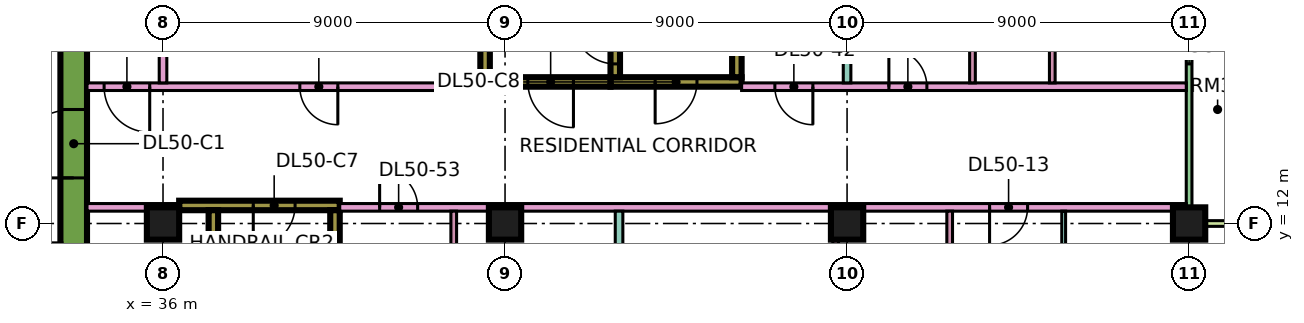
"""IFC4 building model, lengths in metres.
Left out: names, types, materials, properties, quantities, classifications, styles, units other than length and angle.
Written with IfcOpenShell. Run it as: python <this file> out.ifc"""

import sys

from ifc_helpers import new_model, si_unit, direction, frame, frame_2d, origin, origin_2d, place, context, subcontext, project, spatial, rectangle, extrude, element, fill, save


model = new_model("IFC4")
c1 = context("Model", 3, precision=1e-05, world=origin(), true_north=direction((0.0, 1.0)))
c2 = subcontext(c1, "Body", "Model", "MODEL_VIEW")
j1 = project(units=[si_unit("LENGTHUNIT", "METRE"), si_unit("PLANEANGLEUNIT", "RADIAN")], contexts=[c1])
p1 = place(None, origin())
s1 = spatial("IfcSite", under=j1, at=p1, CompositionType="ELEMENT")
p2 = place(p1, origin())
s2 = spatial("IfcBuilding", under=s1, at=p2, CompositionType="ELEMENT")
p3 = place(p2, frame((0.0, 0.0, 215.4)))
s3 = spatial("IfcBuildingStorey", under=s2, at=p3, CompositionType="ELEMENT", Elevation=215.4)
for number, where, z_axis, x_axis in (
    (1, (36.0, 12.0, 0.0), (0.0, 0.0, 1.0), (1.0, 0.0, 0.0)),
    (2, (45.0, 12.0, 0.0), (0.0, 0.0, 1.0), (1.0, 0.0, 0.0)),
    (3, (54.0, 12.0, 0.0), (0.0, 0.0, 1.0), (1.0, 0.0, 0.0)),
    (4, (63.0, 12.0, 0.0), (0.0, 0.0, 1.0), (1.0, 0.0, 0.0)),
):
    element("IfcColumn", number, at=place(p3, frame(where, z_axis=z_axis, x_axis=x_axis)), inside=s3, PredefinedType="COLUMN", context=c2, shape_type="SweptSolid", body=[
        extrude(rectangle(XDim=0.85, YDim=0.85, at=origin_2d()), origin(), (0.0, 0.0, 1.0), 3.75),
    ])
p4 = place(p3, frame((33.65, 7.7, 0.0), z_axis=(0.0, 0.0, 1.0), x_axis=(0.0, 1.0, 0.0)))
e5 = element("IfcWall", 5, at=p4, inside=s3, PredefinedType="SHEAR", context=c2, shape_type="SweptSolid", body=[
    extrude(rectangle(XDim=11.6, YDim=0.7, at=frame_2d((5.8, 0.0))), origin(), (0.0, 0.0, 1.0), 3.75),
])
p5 = place(p4, frame((5.5, 0.0, 0.0)))
e6 = element("IfcOpeningElement", 6, at=p5, cuts=e5, PredefinedType="OPENING", context=c2, shape_type="SweptSolid", body=[
    extrude(rectangle(XDim=1.8, YDim=2.4, at=frame_2d((0.9, 1.2))), frame((0.0, 0.36, 0.0), z_axis=(0.0, -1.0, 0.0), x_axis=(1.0, 0.0, 0.0)), (0.0, 0.0, 1.0), 0.72),
])
p6 = place(p3, frame((36.425, 12.475, 0.0), z_axis=(0.0, 0.0, 1.0), x_axis=(1.0, 0.0, 0.0)))
e7 = element("IfcWall", 7, at=p6, inside=s3, PredefinedType="SHEAR", context=c2, shape_type="SweptSolid", body=[
    extrude(rectangle(XDim=4.225, YDim=0.25, at=frame_2d((2.112, 0.0))), origin(), (0.0, 0.0, 1.0), 3.75),
])
p7 = place(p6, frame((1.95, 0.0, 0.0)))
e8 = element("IfcOpeningElement", 8, at=p7, cuts=e7, PredefinedType="OPENING", context=c2, shape_type="SweptSolid", body=[
    extrude(rectangle(XDim=1.1, YDim=2.2, at=frame_2d((0.55, 1.1))), frame((0.0, 0.135, 0.0), z_axis=(0.0, -1.0, 0.0), x_axis=(1.0, 0.0, 0.0)), (0.0, 0.0, 1.0), 0.27),
])
for number, where, z_axis, x_axis in (
    (9, (37.325, 5.85, 0.0), (0.0, 0.0, 1.0), (0.0, 1.0, 0.0)),
    (10, (40.525, 5.85, 0.0), (0.0, 0.0, 1.0), (0.0, 1.0, 0.0)),
):
    element("IfcWall", number, at=place(p3, frame(where, z_axis=z_axis, x_axis=x_axis)), inside=s3, PredefinedType="SHEAR", context=c2, shape_type="SweptSolid", body=[
        extrude(rectangle(XDim=6.5, YDim=0.25, at=frame_2d((3.25, 0.0))), origin(), (0.0, 0.0, 1.0), 3.75),
    ])
p8 = place(p3, frame((47.775, 15.725, 0.0), z_axis=(0.0, 0.0, 1.0), x_axis=(1.0, 0.0, 0.0)))
e11 = element("IfcWall", 11, at=p8, inside=s3, PredefinedType="SHEAR", context=c2, shape_type="SweptSolid", body=[
    extrude(rectangle(XDim=3.45, YDim=0.25, at=frame_2d((1.725, 0.0))), origin(), (0.0, 0.0, 1.0), 3.75),
])
p9 = place(p8, frame((1.175, 0.0, 0.0)))
e12 = element("IfcOpeningElement", 12, at=p9, cuts=e11, PredefinedType="OPENING", context=c2, shape_type="SweptSolid", body=[
    extrude(rectangle(XDim=1.1, YDim=2.2, at=frame_2d((0.55, 1.1))), frame((0.0, 0.135, 0.0), z_axis=(0.0, -1.0, 0.0), x_axis=(1.0, 0.0, 0.0)), (0.0, 0.0, 1.0), 0.27),
])
p10 = place(p3, frame((47.9, 15.85, 0.0), z_axis=(0.0, 0.0, 1.0), x_axis=(0.0, 1.0, 0.0)))
e13 = element("IfcWall", 13, at=p10, inside=s3, PredefinedType="SHEAR", context=c2, shape_type="SweptSolid", body=[
    extrude(rectangle(XDim=6.5, YDim=0.25, at=frame_2d((3.25, 0.0))), origin(), (0.0, 0.0, 1.0), 3.75),
])
p11 = place(p10, frame((0.35, 0.0, 0.0)))
e14 = element("IfcOpeningElement", 14, at=p11, cuts=e13, PredefinedType="OPENING", context=c2, shape_type="SweptSolid", body=[
    extrude(rectangle(XDim=1.1, YDim=2.2, at=frame_2d((0.55, 1.1))), frame((0.0, 0.135, 0.0), z_axis=(0.0, -1.0, 0.0), x_axis=(1.0, 0.0, 0.0)), (0.0, 0.0, 1.0), 0.27),
])
p12 = place(p3, frame((51.1, 15.85, 0.0), z_axis=(0.0, 0.0, 1.0), x_axis=(0.0, 1.0, 0.0)))
e15 = element("IfcWall", 15, at=p12, inside=s3, PredefinedType="SHEAR", context=c2, shape_type="SweptSolid", body=[
    extrude(rectangle(XDim=6.5, YDim=0.25, at=frame_2d((3.25, 0.0))), origin(), (0.0, 0.0, 1.0), 3.75),
])
p13 = place(p3, frame((44.35, 15.725, 0.0), z_axis=(0.0, 0.0, 1.0), x_axis=(1.0, 0.0, 0.0)))
e16 = element("IfcWall", 16, at=p13, inside=s3, PredefinedType="SHEAR", context=c2, shape_type="SweptSolid", body=[
    extrude(rectangle(XDim=3.425, YDim=0.25, at=frame_2d((1.712, 0.0))), origin(), (0.0, 0.0, 1.0), 3.75),
])
p14 = place(p13, frame((1.25, 0.0, 0.0)))
e17 = element("IfcOpeningElement", 17, at=p14, cuts=e16, PredefinedType="OPENING", context=c2, shape_type="SweptSolid", body=[
    extrude(rectangle(XDim=1.2, YDim=2.2, at=frame_2d((0.6, 1.1))), frame((0.0, 0.135, 0.0), z_axis=(0.0, -1.0, 0.0), x_axis=(1.0, 0.0, 0.0)), (0.0, 0.0, 1.0), 0.27),
])
p15 = place(p3, frame((44.475, 15.85, 0.0), z_axis=(0.0, 0.0, 1.0), x_axis=(0.0, 1.0, 0.0)))
e18 = element("IfcWall", 18, at=p15, inside=s3, PredefinedType="SHEAR", context=c2, shape_type="SweptSolid", body=[
    extrude(rectangle(XDim=6.5, YDim=0.25, at=frame_2d((3.25, 0.0))), origin(), (0.0, 0.0, 1.0), 3.75),
])
p16 = place(p15, frame((1.75, 0.0, 0.0)))
e19 = element("IfcOpeningElement", 19, at=p16, cuts=e18, PredefinedType="OPENING", context=c2, shape_type="SweptSolid", body=[
    extrude(rectangle(XDim=1.1, YDim=2.2, at=frame_2d((0.55, 1.1))), frame((0.0, 0.135, 0.0), z_axis=(0.0, -1.0, 0.0), x_axis=(1.0, 0.0, 0.0)), (0.0, 0.0, 1.0), 0.27),
])
p17 = place(p15, frame((4.3, 0.0, 0.0)))
e20 = element("IfcOpeningElement", 20, at=p17, cuts=e18, PredefinedType="OPENING", context=c2, shape_type="SweptSolid", body=[
    extrude(rectangle(XDim=1.1, YDim=2.2, at=frame_2d((0.55, 1.1))), frame((0.0, 0.135, 0.0), z_axis=(0.0, -1.0, 0.0), x_axis=(1.0, 0.0, 0.0)), (0.0, 0.0, 1.0), 0.27),
])
p18 = place(p3, frame((63.0, 12.075, 0.0), z_axis=(0.0, 0.0, 1.0), x_axis=(0.0, 1.0, 0.0)))
e21 = element("IfcWall", 21, at=p18, inside=s3, PredefinedType="SOLIDWALL", context=c2, shape_type="SweptSolid", body=[
    extrude(rectangle(XDim=10.35, YDim=0.15, at=frame_2d((5.175, 0.0))), origin(), (0.0, 0.0, 1.0), 3.35),
])
p19 = place(p18, frame((4.125, 0.0, 0.45)))
e22 = element("IfcOpeningElement", 22, at=p19, cuts=e21, PredefinedType="OPENING", context=c2, shape_type="SweptSolid", body=[
    extrude(rectangle(XDim=1.8, YDim=2.4, at=frame_2d((0.9, 1.2))), frame((0.0, 0.085, 0.0), z_axis=(0.0, -1.0, 0.0), x_axis=(1.0, 0.0, 0.0)), (0.0, 0.0, 1.0), 0.17),
])
p20 = place(p18, frame((7.538, 0.0, 0.0)))
e23 = element("IfcOpeningElement", 23, at=p20, cuts=e21, PredefinedType="OPENING", context=c2, shape_type="SweptSolid", body=[
    extrude(rectangle(XDim=1.8, YDim=2.4, at=frame_2d((0.9, 1.2))), frame((0.0, 0.085, 0.0), z_axis=(0.0, -1.0, 0.0), x_axis=(1.0, 0.0, 0.0)), (0.0, 0.0, 1.0), 0.17),
])
p21 = place(p3, frame((64.5, 12.0, 0.0), z_axis=(0.0, 0.0, 1.0), x_axis=(-1.0, 0.0, 0.0)))
e24 = element("IfcWall", 24, at=p21, inside=s3, PredefinedType="SOLIDWALL", context=c2, shape_type="SweptSolid", body=[
    extrude(rectangle(XDim=1.5, YDim=0.15, at=frame_2d((0.75, 0.0))), origin(), (0.0, 0.0, 1.0), 3.35),
])
p22 = place(p3, frame((34.0, 12.425, 0.0), z_axis=(0.0, 0.0, 1.0), x_axis=(1.0, 0.0, 0.0)))
e25 = element("IfcWall", 25, at=p22, inside=s3, PredefinedType="PARTITIONING", context=c2, shape_type="SweptSolid", body=[
    extrude(rectangle(XDim=2.426, YDim=0.2, at=frame_2d((1.213, 0.0))), origin(), (0.0, 0.0, 1.0), 3.35),
])
p23 = place(p3, frame((34.0, 15.6, 0.0), z_axis=(0.0, 0.0, 1.0), x_axis=(1.0, 0.0, 0.0)))
e26 = element("IfcWall", 26, at=p23, inside=s3, PredefinedType="PARTITIONING", context=c2, shape_type="SweptSolid", body=[
    extrude(rectangle(XDim=10.35, YDim=0.2, at=frame_2d((5.175, 0.0))), origin(), (0.0, 0.0, 1.0), 3.35),
])
p24 = place(p23, frame((5.6, 0.0, 0.0)))
e27 = element("IfcOpeningElement", 27, at=p24, cuts=e26, PredefinedType="OPENING", context=c2, shape_type="SweptSolid", body=[
    extrude(rectangle(XDim=1.0, YDim=2.1, at=frame_2d((0.5, 1.05))), frame((0.0, 0.11, 0.0), z_axis=(0.0, -1.0, 0.0), x_axis=(1.0, 0.0, 0.0)), (0.0, 0.0, 1.0), 0.22),
])
p25 = place(p23, frame((0.45, 0.0, 0.0)))
e28 = element("IfcOpeningElement", 28, at=p25, cuts=e26, PredefinedType="OPENING", context=c2, shape_type="SweptSolid", body=[
    extrude(rectangle(XDim=1.2, YDim=2.1, at=frame_2d((0.6, 1.05))), frame((0.0, 0.11, 0.0), z_axis=(0.0, -1.0, 0.0), x_axis=(1.0, 0.0, 0.0)), (0.0, 0.0, 1.0), 0.22),
])
p26 = place(p3, frame((36.0, 15.7, 0.0), z_axis=(0.0, 0.0, 1.0), x_axis=(0.0, 1.0, 0.0)))
e29 = element("IfcWall", 29, at=p26, inside=s3, PredefinedType="PARTITIONING", context=c2, shape_type="SweptSolid", body=[
    extrude(rectangle(XDim=8.3, YDim=0.2, at=frame_2d((4.15, 0.0))), origin(), (0.0, 0.0, 1.0), 3.35),
])
p27 = place(p3, frame((40.65, 12.425, 0.0), z_axis=(0.0, 0.0, 1.0), x_axis=(1.0, 0.0, 0.0)))
e30 = element("IfcWall", 30, at=p27, inside=s3, PredefinedType="PARTITIONING", context=c2, shape_type="SweptSolid", body=[
    extrude(rectangle(XDim=22.276, YDim=0.2, at=frame_2d((11.138, 0.0))), origin(), (0.0, 0.0, 1.0), 3.35),
])
p28 = place(p27, frame((17.1, 0.0, 0.0)))
e31 = element("IfcOpeningElement", 31, at=p28, cuts=e30, PredefinedType="OPENING", context=c2, shape_type="SweptSolid", body=[
    extrude(rectangle(XDim=1.0, YDim=2.1, at=frame_2d((0.5, 1.05))), frame((0.0, 0.11, 0.0), z_axis=(0.0, -1.0, 0.0), x_axis=(1.0, 0.0, 0.0)), (0.0, 0.0, 1.0), 0.22),
])
p29 = place(p27, frame((1.05, 0.0, 0.0)))
e32 = element("IfcOpeningElement", 32, at=p29, cuts=e30, PredefinedType="OPENING", context=c2, shape_type="SweptSolid", body=[
    extrude(rectangle(XDim=1.0, YDim=2.1, at=frame_2d((0.5, 1.05))), frame((0.0, 0.11, 0.0), z_axis=(0.0, -1.0, 0.0), x_axis=(1.0, 0.0, 0.0)), (0.0, 0.0, 1.0), 0.22),
])
p30 = place(p3, frame((43.65, 5.825, 0.0), z_axis=(0.0, 0.0, 1.0), x_axis=(0.0, 1.0, 0.0)))
e33 = element("IfcWall", 33, at=p30, inside=s3, PredefinedType="PARTITIONING", context=c2, shape_type="SweptSolid", body=[
    extrude(rectangle(XDim=6.5, YDim=0.15, at=frame_2d((3.25, 0.0))), origin(), (0.0, 0.0, 1.0), 3.35),
])
p31 = place(p30, frame((4.425, 0.0, 0.0)))
e34 = element("IfcOpeningElement", 34, at=p31, cuts=e33, PredefinedType="OPENING", context=c2, shape_type="SweptSolid", body=[
    extrude(rectangle(XDim=0.9, YDim=2.1, at=frame_2d((0.45, 1.05))), frame((0.0, 0.085, 0.0), z_axis=(0.0, -1.0, 0.0), x_axis=(1.0, 0.0, 0.0)), (0.0, 0.0, 1.0), 0.17),
])
p32 = place(p3, frame((48.0, 5.825, 0.0), z_axis=(0.0, 0.0, 1.0), x_axis=(0.0, 1.0, 0.0)))
e35 = element("IfcWall", 35, at=p32, inside=s3, PredefinedType="PARTITIONING", context=c2, shape_type="SweptSolid", body=[
    extrude(rectangle(XDim=6.5, YDim=0.2, at=frame_2d((3.25, 0.0))), origin(), (0.0, 0.0, 1.0), 3.35),
])
p33 = place(p3, frame((51.225, 15.6, 0.0), z_axis=(0.0, 0.0, 1.0), x_axis=(1.0, 0.0, 0.0)))
e36 = element("IfcWall", 36, at=p33, inside=s3, PredefinedType="PARTITIONING", context=c2, shape_type="SweptSolid", body=[
    extrude(rectangle(XDim=11.701, YDim=0.2, at=frame_2d((5.851, 0.0))), origin(), (0.0, 0.0, 1.0), 3.35),
])
p34 = place(p33, frame((3.875, 0.0, 0.0)))
e37 = element("IfcOpeningElement", 37, at=p34, cuts=e36, PredefinedType="OPENING", context=c2, shape_type="SweptSolid", body=[
    extrude(rectangle(XDim=1.0, YDim=2.1, at=frame_2d((0.5, 1.05))), frame((0.0, 0.11, 0.0), z_axis=(0.0, -1.0, 0.0), x_axis=(1.0, 0.0, 0.0)), (0.0, 0.0, 1.0), 0.22),
])
p35 = place(p33, frame((0.875, 0.0, 0.0)))
e38 = element("IfcOpeningElement", 38, at=p35, cuts=e36, PredefinedType="OPENING", context=c2, shape_type="SweptSolid", body=[
    extrude(rectangle(XDim=1.0, YDim=2.1, at=frame_2d((0.5, 1.05))), frame((0.0, 0.11, 0.0), z_axis=(0.0, -1.0, 0.0), x_axis=(1.0, 0.0, 0.0)), (0.0, 0.0, 1.0), 0.22),
])
p36 = place(p3, frame((53.7, 7.1, 0.0), z_axis=(0.0, 0.0, 1.0), x_axis=(0.0, 1.0, 0.0)))
e39 = element("IfcWall", 39, at=p36, inside=s3, PredefinedType="PARTITIONING", context=c2, shape_type="SweptSolid", body=[
    extrude(rectangle(XDim=5.225, YDim=0.15, at=frame_2d((2.612, 0.0))), origin(), (0.0, 0.0, 1.0), 3.35),
])
p37 = place(p3, frame((54.0, 15.7, 0.0), z_axis=(0.0, 0.0, 1.0), x_axis=(0.0, 1.0, 0.0)))
e40 = element("IfcWall", 40, at=p37, inside=s3, PredefinedType="PARTITIONING", context=c2, shape_type="SweptSolid", body=[
    extrude(rectangle(XDim=8.3, YDim=0.2, at=frame_2d((4.15, 0.0))), origin(), (0.0, 0.0, 1.0), 3.35),
])
p38 = place(p3, frame((56.7, 7.1, 0.0), z_axis=(0.0, 0.0, 1.0), x_axis=(0.0, 1.0, 0.0)))
e41 = element("IfcWall", 41, at=p38, inside=s3, PredefinedType="PARTITIONING", context=c2, shape_type="SweptSolid", body=[
    extrude(rectangle(XDim=5.225, YDim=0.15, at=frame_2d((2.612, 0.0))), origin(), (0.0, 0.0, 1.0), 3.35),
])
for number, where, z_axis, x_axis in (
    (42, (57.3, 15.7, 0.0), (0.0, 0.0, 1.0), (0.0, 1.0, 0.0)),
    (43, (59.4, 15.7, 0.0), (0.0, 0.0, 1.0), (0.0, 1.0, 0.0)),
):
    element("IfcWall", number, at=place(p3, frame(where, z_axis=z_axis, x_axis=x_axis)), inside=s3, PredefinedType="PARTITIONING", context=c2, shape_type="SweptSolid", body=[
        extrude(rectangle(XDim=2.825, YDim=0.15, at=frame_2d((1.413, 0.0))), origin(), (0.0, 0.0, 1.0), 3.35),
    ])
p39 = place(p3, frame((59.7, 6.975, 0.0), z_axis=(0.0, 0.0, 1.0), x_axis=(0.0, 1.0, 0.0)))
e44 = element("IfcWall", 44, at=p39, inside=s3, PredefinedType="PARTITIONING", context=c2, shape_type="SweptSolid", body=[
    extrude(rectangle(XDim=5.35, YDim=0.1, at=frame_2d((2.675, 0.0))), origin(), (0.0, 0.0, 1.0), 3.35),
])
p40 = place(p39, frame((2.3, 0.0, 0.0)))
e45 = element("IfcOpeningElement", 45, at=p40, cuts=e44, PredefinedType="OPENING", context=c2, shape_type="SweptSolid", body=[
    extrude(rectangle(XDim=0.9, YDim=2.1, at=frame_2d((0.45, 1.05))), frame((0.0, 0.06, 0.0), z_axis=(0.0, -1.0, 0.0), x_axis=(1.0, 0.0, 0.0)), (0.0, 0.0, 1.0), 0.12),
])
p41 = place(p19, origin())
e46 = element("IfcWindow", 46, at=p41, inside=s3, PartitioningType="SINGLE_PANEL", PredefinedType="WINDOW", context=c2, shape_type="SweptSolid", body=[
    extrude(rectangle(XDim=1.8, YDim=2.4, at=frame_2d((0.9, 1.2))), frame((0.0, 0.03, 0.0), z_axis=(0.0, -1.0, 0.0), x_axis=(1.0, 0.0, 0.0)), (0.0, 0.0, 1.0), 0.06),
])
fill(e22, e46)
p42 = place(p5, origin())
e47 = element("IfcDoor", 47, at=p42, inside=s3, OperationType="DOUBLE_DOOR_SINGLE_SWING", PredefinedType="DOOR", context=c2, shape_type="SweptSolid", body=[
    extrude(rectangle(XDim=1.8, YDim=2.4, at=frame_2d((0.9, 1.2))), frame((0.0, 0.025, 0.0), z_axis=(0.0, -1.0, 0.0), x_axis=(1.0, 0.0, 0.0)), (0.0, 0.0, 1.0), 0.05),
])
fill(e6, e47)
p43 = place(p7, frame((1.1, 0.0, 0.0), z_axis=(0.0, 0.0, 1.0), x_axis=(-1.0, 0.0, 0.0)))
e48 = element("IfcDoor", 48, at=p43, inside=s3, OperationType="SINGLE_SWING_LEFT", PredefinedType="DOOR", context=c2, shape_type="SweptSolid", body=[
    extrude(rectangle(XDim=1.1, YDim=2.2, at=frame_2d((0.55, 1.1))), frame((0.0, 0.025, 0.0), z_axis=(0.0, -1.0, 0.0), x_axis=(1.0, 0.0, 0.0)), (0.0, 0.0, 1.0), 0.05),
])
fill(e8, e48)
p44 = place(p9, frame((1.1, 0.0, 0.0), z_axis=(0.0, 0.0, 1.0), x_axis=(-1.0, 0.0, 0.0)))
e49 = element("IfcDoor", 49, at=p44, inside=s3, OperationType="SINGLE_SWING_LEFT", PredefinedType="DOOR", context=c2, shape_type="SweptSolid", body=[
    extrude(rectangle(XDim=1.1, YDim=2.2, at=frame_2d((0.55, 1.1))), frame((0.0, 0.025, 0.0), z_axis=(0.0, -1.0, 0.0), x_axis=(1.0, 0.0, 0.0)), (0.0, 0.0, 1.0), 0.05),
])
fill(e12, e49)
p45 = place(p14, origin())
e50 = element("IfcDoor", 50, at=p45, inside=s3, OperationType="SINGLE_SWING_RIGHT", PredefinedType="DOOR", context=c2, shape_type="SweptSolid", body=[
    extrude(rectangle(XDim=1.2, YDim=2.2, at=frame_2d((0.6, 1.1))), frame((0.0, 0.025, 0.0), z_axis=(0.0, -1.0, 0.0), x_axis=(1.0, 0.0, 0.0)), (0.0, 0.0, 1.0), 0.05),
])
fill(e17, e50)
p46 = place(p11, frame((1.1, 0.0, 0.0), z_axis=(0.0, 0.0, 1.0), x_axis=(-1.0, 0.0, 0.0)))
e51 = element("IfcDoor", 51, at=p46, inside=s3, OperationType="SINGLE_SWING_RIGHT", PredefinedType="DOOR", context=c2, shape_type="SweptSolid", body=[
    extrude(rectangle(XDim=1.1, YDim=2.2, at=frame_2d((0.55, 1.1))), frame((0.0, 0.025, 0.0), z_axis=(0.0, -1.0, 0.0), x_axis=(1.0, 0.0, 0.0)), (0.0, 0.0, 1.0), 0.05),
])
fill(e14, e51)
p47 = place(p24, origin())
e52 = element("IfcDoor", 52, at=p47, inside=s3, OperationType="SINGLE_SWING_RIGHT", PredefinedType="DOOR", context=c2, shape_type="SweptSolid", body=[
    extrude(rectangle(XDim=1.0, YDim=2.1, at=frame_2d((0.5, 1.05))), frame((0.0, 0.025, 0.0), z_axis=(0.0, -1.0, 0.0), x_axis=(1.0, 0.0, 0.0)), (0.0, 0.0, 1.0), 0.05),
])
fill(e27, e52)
p48 = place(p34, origin())
e53 = element("IfcDoor", 53, at=p48, inside=s3, OperationType="SINGLE_SWING_LEFT", PredefinedType="DOOR", context=c2, shape_type="SweptSolid", body=[
    extrude(rectangle(XDim=1.0, YDim=2.1, at=frame_2d((0.5, 1.05))), frame((0.0, 0.025, 0.0), z_axis=(0.0, -1.0, 0.0), x_axis=(1.0, 0.0, 0.0)), (0.0, 0.0, 1.0), 0.05),
])
fill(e37, e53)
p49 = place(p28, frame((1.0, 0.0, 0.0), z_axis=(0.0, 0.0, 1.0), x_axis=(-1.0, 0.0, 0.0)))
e54 = element("IfcDoor", 54, at=p49, inside=s3, OperationType="SINGLE_SWING_LEFT", PredefinedType="DOOR", context=c2, shape_type="SweptSolid", body=[
    extrude(rectangle(XDim=1.0, YDim=2.1, at=frame_2d((0.5, 1.05))), frame((0.0, 0.025, 0.0), z_axis=(0.0, -1.0, 0.0), x_axis=(1.0, 0.0, 0.0)), (0.0, 0.0, 1.0), 0.05),
])
fill(e31, e54)
p50 = place(p25, origin())
e55 = element("IfcDoor", 55, at=p50, inside=s3, OperationType="SINGLE_SWING_RIGHT", PredefinedType="DOOR", context=c2, shape_type="SweptSolid", body=[
    extrude(rectangle(XDim=1.2, YDim=2.1, at=frame_2d((0.6, 1.05))), frame((0.0, 0.025, 0.0), z_axis=(0.0, -1.0, 0.0), x_axis=(1.0, 0.0, 0.0)), (0.0, 0.0, 1.0), 0.05),
])
fill(e28, e55)
p51 = place(p35, origin())
e56 = element("IfcDoor", 56, at=p51, inside=s3, OperationType="SINGLE_SWING_RIGHT", PredefinedType="DOOR", context=c2, shape_type="SweptSolid", body=[
    extrude(rectangle(XDim=1.0, YDim=2.1, at=frame_2d((0.5, 1.05))), frame((0.0, 0.025, 0.0), z_axis=(0.0, -1.0, 0.0), x_axis=(1.0, 0.0, 0.0)), (0.0, 0.0, 1.0), 0.05),
])
fill(e38, e56)
p52 = place(p29, origin())
e57 = element("IfcDoor", 57, at=p52, inside=s3, OperationType="SINGLE_SWING_LEFT", PredefinedType="DOOR", context=c2, shape_type="SweptSolid", body=[
    extrude(rectangle(XDim=1.0, YDim=2.1, at=frame_2d((0.5, 1.05))), frame((0.0, 0.025, 0.0), z_axis=(0.0, -1.0, 0.0), x_axis=(1.0, 0.0, 0.0)), (0.0, 0.0, 1.0), 0.05),
])
fill(e32, e57)
save(model, sys.argv[1])
